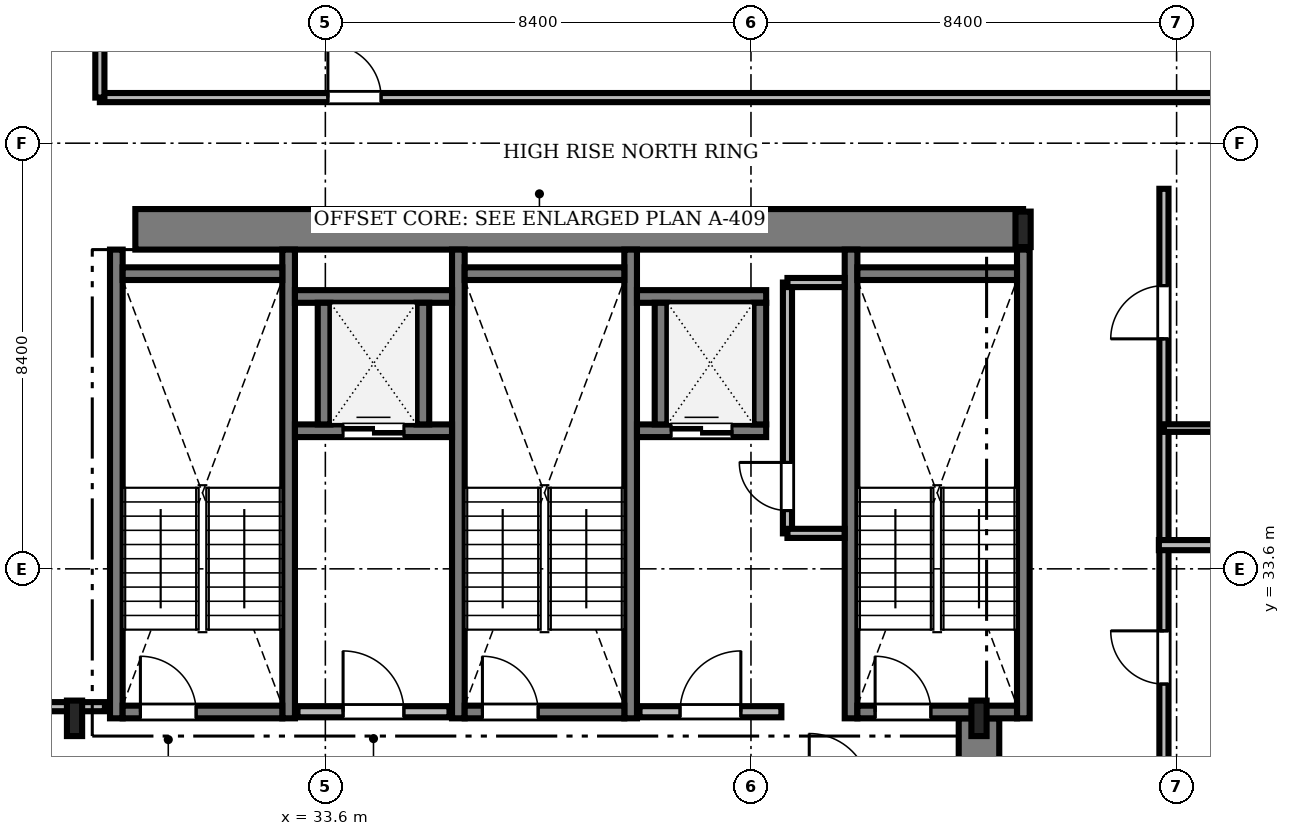
"""IFC4 building model, lengths in metres.
Left out: names, types, materials, properties, quantities, classifications, styles, units other than length and angle.
Written with IfcOpenShell. Run it as: python <this file> out.ifc"""

import sys

from ifc_helpers import new_model, si_unit, direction, frame, frame_2d, origin, origin_2d, place, context, subcontext, project, spatial, rectangle, i_section, extrude, source, transform, mapped, element, fill, save


model = new_model("IFC4")
c1 = context("Model", 3, precision=1e-05, world=origin(), true_north=direction((0.0, 1.0)))
c2 = subcontext(c1, "Body", "Model", "MODEL_VIEW")
j1 = project(units=[si_unit("LENGTHUNIT", "METRE"), si_unit("PLANEANGLEUNIT", "RADIAN")], contexts=[c1])
p1 = place(None, origin())
s1 = spatial("IfcSite", under=j1, at=p1, CompositionType="ELEMENT")
p2 = place(p1, origin())
s2 = spatial("IfcBuilding", under=s1, at=p2, CompositionType="ELEMENT")
p3 = place(p2, frame((0.0, 0.0, 226.05)))
s3 = spatial("IfcBuildingStorey", under=s2, at=p3, CompositionType="ELEMENT", Elevation=226.05)
m1 = source(origin(), c2, "Body", "SweptSolid", [
    extrude(rectangle(XDim=17.52, YDim=0.8, at=frame_2d((8.76, 0.0))), origin(), (0.0, 0.0, 1.0), 3.53),
])
p4 = place(p3, frame((29.85, 40.3, 0.0), z_axis=(0.0, 0.0, 1.0), x_axis=(1.0, 0.0, 0.0)))
e1 = element("IfcWall", 1, at=p4, inside=s3, PredefinedType="SHEAR", context=c2, shape_type="MappedRepresentation", body=[
    mapped(m1, transform((0.0, 0.0, 0.0), scale=1.0)),
])
m2 = source(origin(), c2, "Body", "SweptSolid", [
    extrude(rectangle(XDim=13.15, YDim=0.8, at=frame_2d((6.575, 0.0))), origin(), (0.0, 0.0, 1.0), 3.53),
])
p5 = place(p3, frame((46.5, 17.5, 0.0), z_axis=(0.0, 0.0, 1.0), x_axis=(0.0, 1.0, 0.0)))
e2 = element("IfcWall", 2, at=p5, inside=s3, PredefinedType="SHEAR", context=c2, shape_type="MappedRepresentation", body=[
    mapped(m2, transform((0.0, 0.0, 0.0), scale=1.0)),
])
m3 = source(origin(), c2, "Body", "SweptSolid", [
    extrude(i_section(OverallWidth=0.3, OverallDepth=0.7, WebThickness=0.017, FlangeThickness=0.032, FilletRadius=0.027, at=origin_2d()), origin(), (0.0, 0.0, 1.0), 3.53),
])
for number, where, z_axis, x_axis in (
    (3, (28.65, 30.65, 0.0), (0.0, 0.0, 1.0), (1.0, 0.0, 0.0)),
    (4, (46.5, 30.65, 0.0), (0.0, 0.0, 1.0), (1.0, 0.0, 0.0)),
    (5, (47.37, 40.3, 0.0), (0.0, 0.0, 1.0), (1.0, 0.0, 0.0)),
):
    element("IfcColumn", number, at=place(p3, frame(where, z_axis=z_axis, x_axis=x_axis)), inside=s3, PredefinedType="COLUMN", context=c2, shape_type="MappedRepresentation", body=[
        mapped(m3, transform((0.0, 0.0, 0.0), scale=1.0)),
    ])
m4 = source(origin(), c2, "Body", "SweptSolid", [
    extrude(rectangle(XDim=9.25, YDim=0.25, at=frame_2d((4.625, 0.0))), origin(), (0.0, 0.0, 1.0), 3.55),
])
for number, where, z_axis, x_axis in (
    (6, (29.475, 30.65, 0.0), (0.0, 0.0, 1.0), (0.0, 1.0, 0.0)),
    (7, (32.875, 30.65, 0.0), (0.0, 0.0, 1.0), (0.0, 1.0, 0.0)),
):
    element("IfcWall", number, at=place(p3, frame(where, z_axis=z_axis, x_axis=x_axis)), inside=s3, PredefinedType="SOLIDWALL", context=c2, shape_type="MappedRepresentation", body=[
        mapped(m4, transform((0.0, 0.0, 0.0), scale=1.0)),
    ])
m5 = source(origin(), c2, "Body", "SweptSolid", [
    extrude(rectangle(XDim=3.15, YDim=0.25, at=frame_2d((1.575, 0.0))), origin(), (0.0, 0.0, 1.0), 3.55),
])
p6 = place(p3, frame((29.6, 39.425, 0.0), z_axis=(0.0, 0.0, 1.0), x_axis=(1.0, 0.0, 0.0)))
e8 = element("IfcWall", 8, at=p6, inside=s3, PredefinedType="SOLIDWALL", context=c2, shape_type="MappedRepresentation", body=[
    mapped(m5, transform((0.0, 0.0, 0.0), scale=1.0)),
])
p7 = place(p3, frame((29.6, 30.775, 0.0), z_axis=(0.0, 0.0, 1.0), x_axis=(1.0, 0.0, 0.0)))
e9 = element("IfcWall", 9, at=p7, inside=s3, PredefinedType="SOLIDWALL", context=c2, shape_type="MappedRepresentation", body=[
    mapped(m5, transform((0.0, 0.0, 0.0), scale=1.0)),
])
m6 = source(origin(), c2, "Body", "SweptSolid", [
    extrude(rectangle(XDim=1.1, YDim=2.2, at=frame_2d((0.55, 1.1))), frame((0.0, 0.135, 0.0), z_axis=(0.0, -1.0, 0.0), x_axis=(1.0, 0.0, 0.0)), (0.0, 0.0, 1.0), 0.27),
])
p8 = place(p7, frame((0.35, 0.0, 0.0)))
e10 = element("IfcOpeningElement", 10, at=p8, cuts=e9, PredefinedType="OPENING", context=c2, shape_type="MappedRepresentation", body=[
    mapped(m6, transform((0.0, 0.0, 0.0), scale=1.0)),
])
for number, where, z_axis, x_axis in (
    (11, (36.225, 30.65, 0.0), (0.0, 0.0, 1.0), (0.0, 1.0, 0.0)),
    (12, (39.625, 30.65, 0.0), (0.0, 0.0, 1.0), (0.0, 1.0, 0.0)),
):
    element("IfcWall", number, at=place(p3, frame(where, z_axis=z_axis, x_axis=x_axis)), inside=s3, PredefinedType="SOLIDWALL", context=c2, shape_type="MappedRepresentation", body=[
        mapped(m4, transform((0.0, 0.0, 0.0), scale=1.0)),
    ])
p9 = place(p3, frame((36.35, 39.425, 0.0), z_axis=(0.0, 0.0, 1.0), x_axis=(1.0, 0.0, 0.0)))
e13 = element("IfcWall", 13, at=p9, inside=s3, PredefinedType="SOLIDWALL", context=c2, shape_type="MappedRepresentation", body=[
    mapped(m5, transform((0.0, 0.0, 0.0), scale=1.0)),
])
p10 = place(p3, frame((36.35, 30.775, 0.0), z_axis=(0.0, 0.0, 1.0), x_axis=(1.0, 0.0, 0.0)))
e14 = element("IfcWall", 14, at=p10, inside=s3, PredefinedType="SOLIDWALL", context=c2, shape_type="MappedRepresentation", body=[
    mapped(m5, transform((0.0, 0.0, 0.0), scale=1.0)),
])
p11 = place(p10, frame((0.35, 0.0, 0.0)))
e15 = element("IfcOpeningElement", 15, at=p11, cuts=e14, PredefinedType="OPENING", context=c2, shape_type="MappedRepresentation", body=[
    mapped(m6, transform((0.0, 0.0, 0.0), scale=1.0)),
])
for number, where, z_axis, x_axis in (
    (16, (43.975, 30.65, 0.0), (0.0, 0.0, 1.0), (0.0, 1.0, 0.0)),
    (17, (47.375, 30.65, 0.0), (0.0, 0.0, 1.0), (0.0, 1.0, 0.0)),
):
    element("IfcWall", number, at=place(p3, frame(where, z_axis=z_axis, x_axis=x_axis)), inside=s3, PredefinedType="SOLIDWALL", context=c2, shape_type="MappedRepresentation", body=[
        mapped(m4, transform((0.0, 0.0, 0.0), scale=1.0)),
    ])
p12 = place(p3, frame((44.1, 39.425, 0.0), z_axis=(0.0, 0.0, 1.0), x_axis=(1.0, 0.0, 0.0)))
e18 = element("IfcWall", 18, at=p12, inside=s3, PredefinedType="SOLIDWALL", context=c2, shape_type="MappedRepresentation", body=[
    mapped(m5, transform((0.0, 0.0, 0.0), scale=1.0)),
])
p13 = place(p3, frame((44.1, 30.775, 0.0), z_axis=(0.0, 0.0, 1.0), x_axis=(1.0, 0.0, 0.0)))
e19 = element("IfcWall", 19, at=p13, inside=s3, PredefinedType="SOLIDWALL", context=c2, shape_type="MappedRepresentation", body=[
    mapped(m5, transform((0.0, 0.0, 0.0), scale=1.0)),
])
p14 = place(p13, frame((0.35, 0.0, 0.0)))
e20 = element("IfcOpeningElement", 20, at=p14, cuts=e19, PredefinedType="OPENING", context=c2, shape_type="MappedRepresentation", body=[
    mapped(m6, transform((0.0, 0.0, 0.0), scale=1.0)),
])
m7 = source(origin(), c2, "Body", "SweptSolid", [
    extrude(rectangle(XDim=3.0, YDim=0.22, at=frame_2d((1.5, 0.0))), origin(), (0.0, 0.0, 1.0), 3.53),
])
p15 = place(p3, frame((33.05, 30.78, 0.0), z_axis=(0.0, 0.0, 1.0), x_axis=(1.0, 0.0, 0.0)))
e21 = element("IfcWall", 21, at=p15, inside=s3, PredefinedType="SOLIDWALL", context=c2, shape_type="MappedRepresentation", body=[
    mapped(m7, transform((0.0, 0.0, 0.0), scale=1.0)),
])
m8 = source(origin(), c2, "Body", "SweptSolid", [
    extrude(rectangle(XDim=1.2, YDim=2.2, at=frame_2d((0.6, 1.1))), frame((0.0, 0.12, 0.0), z_axis=(0.0, -1.0, 0.0), x_axis=(1.0, 0.0, 0.0)), (0.0, 0.0, 1.0), 0.24),
])
p16 = place(p15, frame((0.9, 0.0, 0.0)))
e22 = element("IfcOpeningElement", 22, at=p16, cuts=e21, PredefinedType="OPENING", context=c2, shape_type="MappedRepresentation", body=[
    mapped(m8, transform((0.0, 0.0, 0.0), scale=1.0)),
])
m9 = source(origin(), c2, "Body", "SweptSolid", [
    extrude(rectangle(XDim=2.8, YDim=0.22, at=frame_2d((1.4, 0.0))), origin(), (0.0, 0.0, 1.0), 3.53),
])
p17 = place(p3, frame((39.8, 30.78, 0.0), z_axis=(0.0, 0.0, 1.0), x_axis=(1.0, 0.0, 0.0)))
e23 = element("IfcWall", 23, at=p17, inside=s3, PredefinedType="SOLIDWALL", context=c2, shape_type="MappedRepresentation", body=[
    mapped(m9, transform((0.0, 0.0, 0.0), scale=1.0)),
])
p18 = place(p17, frame((0.8, 0.0, 0.0)))
e24 = element("IfcOpeningElement", 24, at=p18, cuts=e23, PredefinedType="OPENING", context=c2, shape_type="MappedRepresentation", body=[
    mapped(m8, transform((0.0, 0.0, 0.0), scale=1.0)),
])
m10 = source(origin(), c2, "Body", "SweptSolid", [
    extrude(rectangle(XDim=3.1, YDim=0.25, at=frame_2d((1.55, 0.0))), origin(), (0.0, 0.0, 1.0), 3.53),
])
p19 = place(p3, frame((33.0, 36.325, 0.0), z_axis=(0.0, 0.0, 1.0), x_axis=(1.0, 0.0, 0.0)))
e25 = element("IfcWall", 25, at=p19, inside=s3, PredefinedType="SOLIDWALL", context=c2, shape_type="MappedRepresentation", body=[
    mapped(m10, transform((0.0, 0.0, 0.0), scale=1.0)),
])
m11 = source(origin(), c2, "Body", "SweptSolid", [
    extrude(rectangle(XDim=1.2, YDim=2.25, at=frame_2d((0.6, 1.125))), frame((0.0, 0.135, 0.0), z_axis=(0.0, -1.0, 0.0), x_axis=(1.0, 0.0, 0.0)), (0.0, 0.0, 1.0), 0.27),
])
p20 = place(p19, frame((0.95, 0.0, 0.0)))
e26 = element("IfcOpeningElement", 26, at=p20, cuts=e25, PredefinedType="OPENING", context=c2, shape_type="MappedRepresentation", body=[
    mapped(m11, transform((0.0, 0.0, 0.0), scale=1.0)),
])
p21 = place(p3, frame((33.0, 38.975, 0.0), z_axis=(0.0, 0.0, 1.0), x_axis=(1.0, 0.0, 0.0)))
e27 = element("IfcWall", 27, at=p21, inside=s3, PredefinedType="SOLIDWALL", context=c2, shape_type="MappedRepresentation", body=[
    mapped(m10, transform((0.0, 0.0, 0.0), scale=1.0)),
])
m12 = source(origin(), c2, "Body", "SweptSolid", [
    extrude(rectangle(XDim=2.4, YDim=0.25, at=frame_2d((1.2, 0.0))), origin(), (0.0, 0.0, 1.0), 3.53),
])
for number, where, z_axis, x_axis in (
    (28, (33.575, 36.45, 0.0), (0.0, 0.0, 1.0), (0.0, 1.0, 0.0)),
    (29, (35.525, 36.45, 0.0), (0.0, 0.0, 1.0), (0.0, 1.0, 0.0)),
):
    element("IfcWall", number, at=place(p3, frame(where, z_axis=z_axis, x_axis=x_axis)), inside=s3, PredefinedType="SOLIDWALL", context=c2, shape_type="MappedRepresentation", body=[
        mapped(m12, transform((0.0, 0.0, 0.0), scale=1.0)),
    ])
m13 = source(origin(), c2, "Body", "SweptSolid", [
    extrude(rectangle(XDim=2.55, YDim=0.25, at=frame_2d((1.275, 0.0))), origin(), (0.0, 0.0, 1.0), 3.53),
])
p22 = place(p3, frame((39.75, 36.325, 0.0), z_axis=(0.0, 0.0, 1.0), x_axis=(1.0, 0.0, 0.0)))
e30 = element("IfcWall", 30, at=p22, inside=s3, PredefinedType="SOLIDWALL", context=c2, shape_type="MappedRepresentation", body=[
    mapped(m13, transform((0.0, 0.0, 0.0), scale=1.0)),
])
p23 = place(p22, frame((0.675, 0.0, 0.0)))
e31 = element("IfcOpeningElement", 31, at=p23, cuts=e30, PredefinedType="OPENING", context=c2, shape_type="MappedRepresentation", body=[
    mapped(m11, transform((0.0, 0.0, 0.0), scale=1.0)),
])
p24 = place(p3, frame((39.75, 38.975, 0.0), z_axis=(0.0, 0.0, 1.0), x_axis=(1.0, 0.0, 0.0)))
e32 = element("IfcWall", 32, at=p24, inside=s3, PredefinedType="SOLIDWALL", context=c2, shape_type="MappedRepresentation", body=[
    mapped(m13, transform((0.0, 0.0, 0.0), scale=1.0)),
])
for number, where, z_axis, x_axis in (
    (33, (40.225, 36.45, 0.0), (0.0, 0.0, 1.0), (0.0, 1.0, 0.0)),
    (34, (42.175, 36.45, 0.0), (0.0, 0.0, 1.0), (0.0, 1.0, 0.0)),
):
    element("IfcWall", number, at=place(p3, frame(where, z_axis=z_axis, x_axis=x_axis)), inside=s3, PredefinedType="SOLIDWALL", context=c2, shape_type="MappedRepresentation", body=[
        mapped(m12, transform((0.0, 0.0, 0.0), scale=1.0)),
    ])
m14 = source(origin(), c2, "Body", "SweptSolid", [
    extrude(rectangle(XDim=28.428, YDim=0.18, at=frame_2d((14.214, 0.0))), origin(), (0.0, 0.0, 1.0), 2.772),
])
p25 = place(p3, frame((29.15, 42.9, 0.0), z_axis=(0.0, 0.0, 1.0), x_axis=(1.0, 0.0, 0.0)))
e35 = element("IfcWall", 35, at=p25, inside=s3, PredefinedType="PARTITIONING", context=c2, shape_type="MappedRepresentation", body=[
    mapped(m14, transform((0.0, 0.0, 0.0), scale=1.0)),
])
m15 = source(origin(), c2, "Body", "SweptSolid", [
    extrude(rectangle(XDim=1.05, YDim=2.2, at=frame_2d((0.525, 1.1))), frame((0.0, 0.1, 0.0), z_axis=(0.0, -1.0, 0.0), x_axis=(1.0, 0.0, 0.0)), (0.0, 0.0, 1.0), 0.2),
])
p26 = place(p25, frame((4.5, 0.0, 0.0)))
e36 = element("IfcOpeningElement", 36, at=p26, cuts=e35, PredefinedType="OPENING", context=c2, shape_type="MappedRepresentation", body=[
    mapped(m15, transform((0.0, 0.0, 0.0), scale=1.0)),
])
m16 = source(origin(), c2, "Body", "SweptSolid", [
    extrude(rectangle(XDim=27.47, YDim=0.18, at=frame_2d((13.735, 0.0))), origin(), (0.0, 0.0, 1.0), 2.972),
])
p27 = place(p3, frame((50.15, 13.63, 0.0), z_axis=(0.0, 0.0, 1.0), x_axis=(0.0, 1.0, 0.0)))
e37 = element("IfcWall", 37, at=p27, inside=s3, PredefinedType="PARTITIONING", context=c2, shape_type="MappedRepresentation", body=[
    mapped(m16, transform((0.0, 0.0, 0.0), scale=1.0)),
])
p28 = place(p27, frame((4.071, 0.0, 0.0)))
e38 = element("IfcOpeningElement", 38, at=p28, cuts=e37, PredefinedType="OPENING", context=c2, shape_type="MappedRepresentation", body=[
    mapped(m15, transform((0.0, 0.0, 0.0), scale=1.0)),
])
p29 = place(p27, frame((10.884, 0.0, 0.0)))
e39 = element("IfcOpeningElement", 39, at=p29, cuts=e37, PredefinedType="OPENING", context=c2, shape_type="MappedRepresentation", body=[
    mapped(m15, transform((0.0, 0.0, 0.0), scale=1.0)),
])
p30 = place(p27, frame((17.696, 0.0, 0.0)))
e40 = element("IfcOpeningElement", 40, at=p30, cuts=e37, PredefinedType="OPENING", context=c2, shape_type="MappedRepresentation", body=[
    mapped(m15, transform((0.0, 0.0, 0.0), scale=1.0)),
])
p31 = place(p27, frame((24.509, 0.0, 0.0)))
e41 = element("IfcOpeningElement", 41, at=p31, cuts=e37, PredefinedType="OPENING", context=c2, shape_type="MappedRepresentation", body=[
    mapped(m15, transform((0.0, 0.0, 0.0), scale=1.0)),
])
m17 = source(origin(), c2, "Body", "SweptSolid", [
    extrude(rectangle(XDim=17.828, YDim=0.18, at=frame_2d((8.914, 0.0))), origin(), (0.0, 0.0, 1.0), 2.772),
])
p32 = place(p3, frame((11.422, 30.88, 0.0), z_axis=(0.0, 0.0, 1.0), x_axis=(1.0, 0.0, 0.0)))
e42 = element("IfcWall", 42, at=p32, inside=s3, PredefinedType="PARTITIONING", context=c2, shape_type="MappedRepresentation", body=[
    mapped(m17, transform((0.0, 0.0, 0.0), scale=1.0)),
])
p33 = place(p32, frame((10.778, 0.0, 0.0)))
e43 = element("IfcOpeningElement", 43, at=p33, cuts=e42, PredefinedType="OPENING", context=c2, shape_type="MappedRepresentation", body=[
    mapped(m15, transform((0.0, 0.0, 0.0), scale=1.0)),
])
m18 = source(origin(), c2, "Body", "SweptSolid", [
    extrude(rectangle(XDim=4.95, YDim=0.18, at=frame_2d((2.475, 0.0))), origin(), (0.0, 0.0, 1.0), 3.53),
])
p34 = place(p3, frame((42.72, 34.3, 0.0), z_axis=(0.0, 0.0, 1.0), x_axis=(0.0, 1.0, 0.0)))
e44 = element("IfcWall", 44, at=p34, inside=s3, PredefinedType="PARTITIONING", context=c2, shape_type="MappedRepresentation", body=[
    mapped(m18, transform((0.0, 0.0, 0.0), scale=1.0)),
])
m19 = source(origin(), c2, "Body", "SweptSolid", [
    extrude(rectangle(XDim=0.95, YDim=2.15, at=frame_2d((0.475, 1.075))), frame((0.0, 0.1, 0.0), z_axis=(0.0, -1.0, 0.0), x_axis=(1.0, 0.0, 0.0)), (0.0, 0.0, 1.0), 0.2),
])
p35 = place(p34, frame((0.45, 0.0, 0.0)))
e45 = element("IfcOpeningElement", 45, at=p35, cuts=e44, PredefinedType="OPENING", context=c2, shape_type="MappedRepresentation", body=[
    mapped(m19, transform((0.0, 0.0, 0.0), scale=1.0)),
])
m20 = source(origin(), c2, "Body", "SweptSolid", [
    extrude(rectangle(XDim=7.528, YDim=0.2, at=frame_2d((3.764, 0.0))), origin(), (0.0, 0.0, 1.0), 2.772),
])
p36 = place(p3, frame((50.05, 34.068, 0.0), z_axis=(0.0, 0.0, 1.0), x_axis=(1.0, 0.0, 0.0)))
e46 = element("IfcWall", 46, at=p36, inside=s3, PredefinedType="PARTITIONING", context=c2, shape_type="MappedRepresentation", body=[
    mapped(m20, transform((0.0, 0.0, 0.0), scale=1.0)),
])
m21 = source(origin(), c2, "Body", "SweptSolid", [
    extrude(rectangle(XDim=5.378, YDim=0.18, at=frame_2d((2.689, 0.0))), origin(), (0.0, 0.0, 1.0), 2.772),
])
p37 = place(p3, frame((29.15, 42.9, 0.0), z_axis=(0.0, 0.0, 1.0), x_axis=(0.0, 1.0, 0.0)))
e47 = element("IfcWall", 47, at=p37, inside=s3, PredefinedType="PARTITIONING", context=c2, shape_type="MappedRepresentation", body=[
    mapped(m21, transform((0.0, 0.0, 0.0), scale=1.0)),
])
m22 = source(origin(), c2, "Body", "SweptSolid", [
    extrude(rectangle(XDim=2.36, YDim=0.15, at=frame_2d((1.18, 0.0))), origin(), (0.0, 0.0, 1.0), 3.53),
])
p38 = place(p3, frame((50.15, 36.378, 0.0), z_axis=(0.0, 0.0, 1.0), x_axis=(1.0, 0.0, 0.0)))
e48 = element("IfcWall", 48, at=p38, inside=s3, PredefinedType="PARTITIONING", context=c2, shape_type="MappedRepresentation", body=[
    mapped(m22, transform((0.0, 0.0, 0.0), scale=1.0)),
])
m23 = source(origin(), c2, "Body", "SweptSolid", [
    extrude(rectangle(XDim=1.128, YDim=0.18, at=frame_2d((0.564, 0.0))), origin(), (0.0, 0.0, 1.0), 3.53),
])
for number, where, z_axis, x_axis in (
    (49, (42.72, 34.3, 0.0), (0.0, 0.0, 1.0), (1.0, 0.0, 0.0)),
    (50, (42.72, 39.25, 0.0), (0.0, 0.0, 1.0), (1.0, 0.0, 0.0)),
):
    element("IfcWall", number, at=place(p3, frame(where, z_axis=z_axis, x_axis=x_axis)), inside=s3, PredefinedType="PARTITIONING", context=c2, shape_type="MappedRepresentation", body=[
        mapped(m23, transform((0.0, 0.0, 0.0), scale=1.0)),
    ])
m24 = source(origin(), c2, "Body", "SweptSolid", [
    extrude(rectangle(XDim=1.1, YDim=2.2, at=frame_2d((0.55, 1.1))), frame((0.0, 0.025, 0.0), z_axis=(0.0, -1.0, 0.0), x_axis=(1.0, 0.0, 0.0)), (0.0, 0.0, 1.0), 0.05),
])
p39 = place(p8, origin())
e51 = element("IfcDoor", 51, at=p39, inside=s3, OperationType="SINGLE_SWING_LEFT", PredefinedType="DOOR", context=c2, shape_type="MappedRepresentation", body=[
    mapped(m24, transform((0.0, 0.0, 0.0), scale=1.0)),
])
fill(e10, e51)
p40 = place(p11, origin())
e52 = element("IfcDoor", 52, at=p40, inside=s3, OperationType="SINGLE_SWING_LEFT", PredefinedType="DOOR", context=c2, shape_type="MappedRepresentation", body=[
    mapped(m24, transform((0.0, 0.0, 0.0), scale=1.0)),
])
fill(e15, e52)
p41 = place(p14, origin())
e53 = element("IfcDoor", 53, at=p41, inside=s3, OperationType="SINGLE_SWING_LEFT", PredefinedType="DOOR", context=c2, shape_type="MappedRepresentation", body=[
    mapped(m24, transform((0.0, 0.0, 0.0), scale=1.0)),
])
fill(e20, e53)
m25 = source(origin(), c2, "Body", "SweptSolid", [
    extrude(rectangle(XDim=1.2, YDim=2.2, at=frame_2d((0.6, 1.1))), frame((0.0, 0.025, 0.0), z_axis=(0.0, -1.0, 0.0), x_axis=(1.0, 0.0, 0.0)), (0.0, 0.0, 1.0), 0.05),
])
p42 = place(p16, origin())
e54 = element("IfcDoor", 54, at=p42, inside=s3, OperationType="SINGLE_SWING_LEFT", PredefinedType="DOOR", context=c2, shape_type="MappedRepresentation", body=[
    mapped(m25, transform((0.0, 0.0, 0.0), scale=1.0)),
])
fill(e22, e54)
p43 = place(p18, origin())
e55 = element("IfcDoor", 55, at=p43, inside=s3, OperationType="SINGLE_SWING_RIGHT", PredefinedType="DOOR", context=c2, shape_type="MappedRepresentation", body=[
    mapped(m25, transform((0.0, 0.0, 0.0), scale=1.0)),
])
fill(e24, e55)
m26 = source(origin(), c2, "Body", "SweptSolid", [
    extrude(rectangle(XDim=1.2, YDim=2.25, at=frame_2d((0.6, 1.125))), frame((0.0, 0.025, 0.0), z_axis=(0.0, -1.0, 0.0), x_axis=(1.0, 0.0, 0.0)), (0.0, 0.0, 1.0), 0.05),
])
p44 = place(p20, origin())
e56 = element("IfcDoor", 56, at=p44, inside=s3, OperationType="DOUBLE_DOOR_SLIDING", PredefinedType="DOOR", context=c2, shape_type="MappedRepresentation", body=[
    mapped(m26, transform((0.0, 0.0, 0.0), scale=1.0)),
])
fill(e26, e56)
p45 = place(p23, origin())
e57 = element("IfcDoor", 57, at=p45, inside=s3, OperationType="DOUBLE_DOOR_SLIDING", PredefinedType="DOOR", context=c2, shape_type="MappedRepresentation", body=[
    mapped(m26, transform((0.0, 0.0, 0.0), scale=1.0)),
])
fill(e31, e57)
m27 = source(origin(), c2, "Body", "SweptSolid", [
    extrude(rectangle(XDim=1.05, YDim=2.2, at=frame_2d((0.525, 1.1))), frame((0.0, 0.025, 0.0), z_axis=(0.0, -1.0, 0.0), x_axis=(1.0, 0.0, 0.0)), (0.0, 0.0, 1.0), 0.05),
])
p46 = place(p26, origin())
e58 = element("IfcDoor", 58, at=p46, inside=s3, OperationType="SINGLE_SWING_LEFT", PredefinedType="DOOR", context=c2, shape_type="MappedRepresentation", body=[
    mapped(m27, transform((0.0, 0.0, 0.0), scale=1.0)),
])
fill(e36, e58)
p47 = place(p30, origin())
e59 = element("IfcDoor", 59, at=p47, inside=s3, OperationType="SINGLE_SWING_RIGHT", PredefinedType="DOOR", context=c2, shape_type="MappedRepresentation", body=[
    mapped(m27, transform((0.0, 0.0, 0.0), scale=1.0)),
])
fill(e40, e59)
p48 = place(p31, origin())
e60 = element("IfcDoor", 60, at=p48, inside=s3, OperationType="SINGLE_SWING_LEFT", PredefinedType="DOOR", context=c2, shape_type="MappedRepresentation", body=[
    mapped(m27, transform((0.0, 0.0, 0.0), scale=1.0)),
])
fill(e41, e60)
m28 = source(origin(), c2, "Body", "SweptSolid", [
    extrude(rectangle(XDim=0.95, YDim=2.15, at=frame_2d((0.475, 1.075))), frame((0.0, 0.025, 0.0), z_axis=(0.0, -1.0, 0.0), x_axis=(1.0, 0.0, 0.0)), (0.0, 0.0, 1.0), 0.05),
])
p49 = place(p35, origin())
e61 = element("IfcDoor", 61, at=p49, inside=s3, OperationType="SINGLE_SWING_RIGHT", PredefinedType="DOOR", context=c2, shape_type="MappedRepresentation", body=[
    mapped(m28, transform((0.0, 0.0, 0.0), scale=1.0)),
])
fill(e45, e61)
save(model, sys.argv[1])
